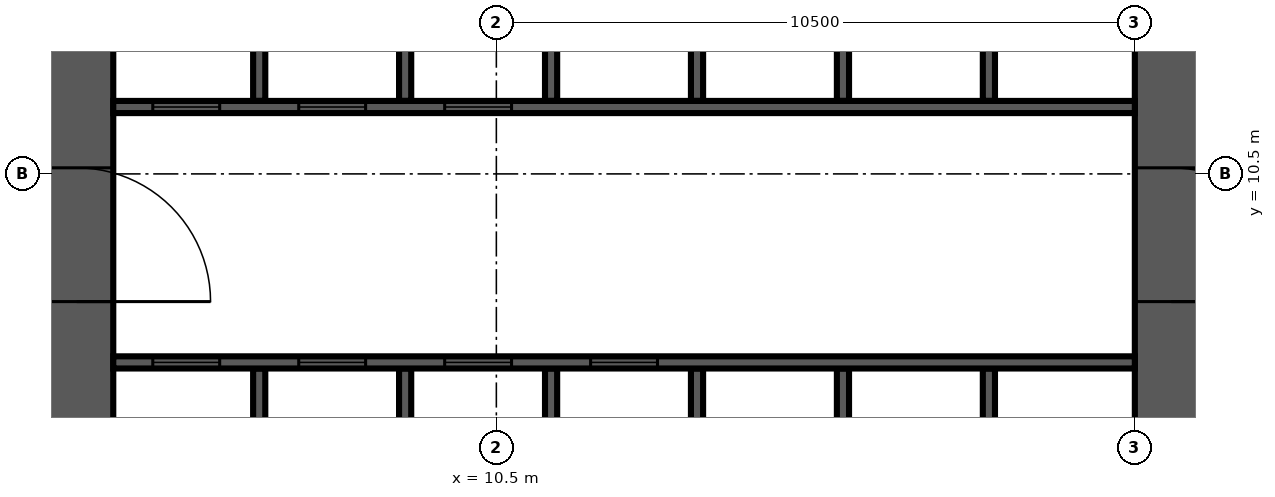
"""IFC4 building model, lengths in metres.
Left out: names, types, materials, properties, quantities, classifications, styles, units other than length and angle.
Written with IfcOpenShell. Run it as: python <this file> out.ifc"""

import sys

from ifc_helpers import new_model, si_unit, direction, frame, frame_2d, origin, place, context, subcontext, project, spatial, rectangle, extrude, source, transform, mapped, element, fill, save


model = new_model("IFC4")
c1 = context("Model", 3, precision=1e-05, world=origin(), true_north=direction((0.0, 1.0)))
c2 = subcontext(c1, "Body", "Model", "MODEL_VIEW")
j1 = project(units=[si_unit("LENGTHUNIT", "METRE"), si_unit("PLANEANGLEUNIT", "RADIAN")], contexts=[c1])
p1 = place(None, origin())
s1 = spatial("IfcSite", under=j1, at=p1, CompositionType="ELEMENT")
p2 = place(p1, origin())
s2 = spatial("IfcBuilding", under=s1, at=p2, CompositionType="ELEMENT")
p3 = place(p2, frame((0.0, 0.0, 86.7)))
s3 = spatial("IfcBuildingStorey", under=s2, at=p3, CompositionType="ELEMENT", Elevation=86.7)
m1 = source(origin(), c2, "Body", "SweptSolid", [
    extrude(rectangle(XDim=18.0, YDim=1.2, at=frame_2d((9.0, 0.0))), origin(), (0.0, 0.0, 1.0), 4.2),
])
p4 = place(p3, frame((3.6, 4.2, 0.0), z_axis=(0.0, 0.0, 1.0), x_axis=(0.0, 1.0, 0.0)))
e1 = element("IfcWall", 1, at=p4, inside=s3, PredefinedType="SHEAR", context=c2, shape_type="MappedRepresentation", body=[
    mapped(m1, transform((0.0, 0.0, 0.0), scale=1.0)),
])
m2 = source(origin(), c2, "Body", "SweptSolid", [
    extrude(rectangle(XDim=2.2, YDim=2.1, at=frame_2d((1.1, 1.05))), frame((0.0, 0.61, 0.0), z_axis=(0.0, -1.0, 0.0), x_axis=(1.0, 0.0, 0.0)), (0.0, 0.0, 1.0), 1.22),
])
p5 = place(p4, frame((4.2, 0.0, 0.0)))
e2 = element("IfcOpeningElement", 2, at=p5, cuts=e1, PredefinedType="OPENING", context=c2, shape_type="MappedRepresentation", body=[
    mapped(m2, transform((0.0, 0.0, 0.0), scale=1.0)),
])
m3 = source(origin(), c2, "Body", "SweptSolid", [
    extrude(rectangle(XDim=16.8, YDim=1.2, at=frame_2d((8.4, 0.0))), origin(), (0.0, 0.0, 1.0), 4.2),
])
p6 = place(p3, frame((21.6, 4.2, 0.0), z_axis=(0.0, 0.0, 1.0), x_axis=(0.0, 1.0, 0.0)))
e3 = element("IfcWall", 3, at=p6, inside=s3, PredefinedType="SHEAR", context=c2, shape_type="MappedRepresentation", body=[
    mapped(m3, transform((0.0, 0.0, 0.0), scale=1.0)),
])
p7 = place(p6, frame((4.2, 0.0, 0.0)))
e4 = element("IfcOpeningElement", 4, at=p7, cuts=e3, PredefinedType="OPENING", context=c2, shape_type="MappedRepresentation", body=[
    mapped(m2, transform((0.0, 0.0, 0.0), scale=1.0)),
])
m4 = source(origin(), c2, "Body", "SweptSolid", [
    extrude(rectangle(XDim=1.2, YDim=2.1, at=frame_2d((0.6, 1.05))), frame((0.0, 0.61, 0.0), z_axis=(0.0, -1.0, 0.0), x_axis=(1.0, 0.0, 0.0)), (0.0, 0.0, 1.0), 1.22),
])
p8 = place(p6, frame((14.7, 0.0, 0.0)))
e5 = element("IfcOpeningElement", 5, at=p8, cuts=e3, PredefinedType="OPENING", context=c2, shape_type="MappedRepresentation", body=[
    mapped(m4, transform((0.0, 0.0, 0.0), scale=1.0)),
])
m5 = source(origin(), c2, "Body", "SweptSolid", [
    extrude(rectangle(XDim=3.1, YDim=0.2, at=frame_2d((1.55, 0.0))), origin(), (0.0, 0.0, 1.0), 4.2),
])
for number, where, z_axis, x_axis in (
    (6, (6.6, 4.2, 0.0), (0.0, 0.0, 1.0), (0.0, 1.0, 0.0)),
    (7, (9.0, 4.2, 0.0), (0.0, 0.0, 1.0), (0.0, 1.0, 0.0)),
    (8, (11.4, 4.2, 0.0), (0.0, 0.0, 1.0), (0.0, 1.0, 0.0)),
    (9, (13.8, 4.2, 0.0), (0.0, 0.0, 1.0), (0.0, 1.0, 0.0)),
    (10, (16.2, 4.2, 0.0), (0.0, 0.0, 1.0), (0.0, 1.0, 0.0)),
    (11, (18.6, 4.2, 0.0), (0.0, 0.0, 1.0), (0.0, 1.0, 0.0)),
):
    element("IfcWall", number, at=place(p3, frame(where, z_axis=z_axis, x_axis=x_axis)), inside=s3, PredefinedType="SOLIDWALL", context=c2, shape_type="MappedRepresentation", body=[
        mapped(m5, transform((0.0, 0.0, 0.0), scale=1.0)),
    ])
m6 = source(origin(), c2, "Body", "SweptSolid", [
    extrude(rectangle(XDim=3.0, YDim=0.2, at=frame_2d((1.5, 0.0))), origin(), (0.0, 0.0, 1.0), 4.2),
])
for number, where, z_axis, x_axis in (
    (12, (6.6, 11.7, 0.0), (0.0, 0.0, 1.0), (0.0, 1.0, 0.0)),
    (13, (9.0, 11.7, 0.0), (0.0, 0.0, 1.0), (0.0, 1.0, 0.0)),
    (14, (11.4, 11.7, 0.0), (0.0, 0.0, 1.0), (0.0, 1.0, 0.0)),
    (15, (13.8, 11.7, 0.0), (0.0, 0.0, 1.0), (0.0, 1.0, 0.0)),
    (16, (16.2, 11.7, 0.0), (0.0, 0.0, 1.0), (0.0, 1.0, 0.0)),
    (17, (18.6, 11.7, 0.0), (0.0, 0.0, 1.0), (0.0, 1.0, 0.0)),
):
    element("IfcWall", number, at=place(p3, frame(where, z_axis=z_axis, x_axis=x_axis)), inside=s3, PredefinedType="SOLIDWALL", context=c2, shape_type="MappedRepresentation", body=[
        mapped(m6, transform((0.0, 0.0, 0.0), scale=1.0)),
    ])
m7 = source(origin(), c2, "Body", "SweptSolid", [
    extrude(rectangle(XDim=16.8, YDim=0.2, at=frame_2d((8.4, 0.0))), origin(), (0.0, 0.0, 1.0), 4.2),
])
p9 = place(p3, frame((4.2, 7.4, 0.0), z_axis=(0.0, 0.0, 1.0), x_axis=(1.0, 0.0, 0.0)))
e18 = element("IfcWall", 18, at=p9, inside=s3, PredefinedType="SOLIDWALL", context=c2, shape_type="MappedRepresentation", body=[
    mapped(m7, transform((0.0, 0.0, 0.0), scale=1.0)),
])
m8 = source(origin(), c2, "Body", "SweptSolid", [
    extrude(rectangle(XDim=1.1, YDim=2.1, at=frame_2d((0.55, 1.05))), frame((0.0, 0.11, 0.0), z_axis=(0.0, -1.0, 0.0), x_axis=(1.0, 0.0, 0.0)), (0.0, 0.0, 1.0), 0.22),
])
p10 = place(p9, frame((0.65, 0.0, 0.0)))
e19 = element("IfcOpeningElement", 19, at=p10, cuts=e18, PredefinedType="OPENING", context=c2, shape_type="MappedRepresentation", body=[
    mapped(m8, transform((0.0, 0.0, 0.0), scale=1.0)),
])
p11 = place(p9, frame((3.05, 0.0, 0.0)))
e20 = element("IfcOpeningElement", 20, at=p11, cuts=e18, PredefinedType="OPENING", context=c2, shape_type="MappedRepresentation", body=[
    mapped(m8, transform((0.0, 0.0, 0.0), scale=1.0)),
])
p12 = place(p9, frame((5.45, 0.0, 0.0)))
e21 = element("IfcOpeningElement", 21, at=p12, cuts=e18, PredefinedType="OPENING", context=c2, shape_type="MappedRepresentation", body=[
    mapped(m8, transform((0.0, 0.0, 0.0), scale=1.0)),
])
p13 = place(p9, frame((7.85, 0.0, 0.0)))
e22 = element("IfcOpeningElement", 22, at=p13, cuts=e18, PredefinedType="OPENING", context=c2, shape_type="MappedRepresentation", body=[
    mapped(m8, transform((0.0, 0.0, 0.0), scale=1.0)),
])
p14 = place(p3, frame((4.2, 11.6, 0.0), z_axis=(0.0, 0.0, 1.0), x_axis=(1.0, 0.0, 0.0)))
e23 = element("IfcWall", 23, at=p14, inside=s3, PredefinedType="SOLIDWALL", context=c2, shape_type="MappedRepresentation", body=[
    mapped(m7, transform((0.0, 0.0, 0.0), scale=1.0)),
])
p15 = place(p14, frame((0.65, 0.0, 0.0)))
e24 = element("IfcOpeningElement", 24, at=p15, cuts=e23, PredefinedType="OPENING", context=c2, shape_type="MappedRepresentation", body=[
    mapped(m8, transform((0.0, 0.0, 0.0), scale=1.0)),
])
p16 = place(p14, frame((3.05, 0.0, 0.0)))
e25 = element("IfcOpeningElement", 25, at=p16, cuts=e23, PredefinedType="OPENING", context=c2, shape_type="MappedRepresentation", body=[
    mapped(m8, transform((0.0, 0.0, 0.0), scale=1.0)),
])
p17 = place(p14, frame((5.45, 0.0, 0.0)))
e26 = element("IfcOpeningElement", 26, at=p17, cuts=e23, PredefinedType="OPENING", context=c2, shape_type="MappedRepresentation", body=[
    mapped(m8, transform((0.0, 0.0, 0.0), scale=1.0)),
])
m9 = source(origin(), c2, "Body", "SweptSolid", [
    extrude(rectangle(XDim=1.1, YDim=2.1, at=frame_2d((0.55, 1.05))), frame((0.0, 0.025, 0.0), z_axis=(0.0, -1.0, 0.0), x_axis=(1.0, 0.0, 0.0)), (0.0, 0.0, 1.0), 0.05),
])
p18 = place(p10, origin())
e27 = element("IfcDoor", 27, at=p18, inside=s3, OperationType="SLIDING_TO_LEFT", PredefinedType="DOOR", context=c2, shape_type="MappedRepresentation", body=[
    mapped(m9, transform((0.0, 0.0, 0.0), scale=1.0)),
])
fill(e19, e27)
p19 = place(p11, origin())
e28 = element("IfcDoor", 28, at=p19, inside=s3, OperationType="SLIDING_TO_LEFT", PredefinedType="DOOR", context=c2, shape_type="MappedRepresentation", body=[
    mapped(m9, transform((0.0, 0.0, 0.0), scale=1.0)),
])
fill(e20, e28)
p20 = place(p12, origin())
e29 = element("IfcDoor", 29, at=p20, inside=s3, OperationType="SLIDING_TO_LEFT", PredefinedType="DOOR", context=c2, shape_type="MappedRepresentation", body=[
    mapped(m9, transform((0.0, 0.0, 0.0), scale=1.0)),
])
fill(e21, e29)
p21 = place(p13, origin())
e30 = element("IfcDoor", 30, at=p21, inside=s3, OperationType="SLIDING_TO_LEFT", PredefinedType="DOOR", context=c2, shape_type="MappedRepresentation", body=[
    mapped(m9, transform((0.0, 0.0, 0.0), scale=1.0)),
])
fill(e22, e30)
p22 = place(p15, origin())
e31 = element("IfcDoor", 31, at=p22, inside=s3, OperationType="SLIDING_TO_LEFT", PredefinedType="DOOR", context=c2, shape_type="MappedRepresentation", body=[
    mapped(m9, transform((0.0, 0.0, 0.0), scale=1.0)),
])
fill(e24, e31)
p23 = place(p16, origin())
e32 = element("IfcDoor", 32, at=p23, inside=s3, OperationType="SLIDING_TO_LEFT", PredefinedType="DOOR", context=c2, shape_type="MappedRepresentation", body=[
    mapped(m9, transform((0.0, 0.0, 0.0), scale=1.0)),
])
fill(e25, e32)
p24 = place(p17, origin())
e33 = element("IfcDoor", 33, at=p24, inside=s3, OperationType="SLIDING_TO_LEFT", PredefinedType="DOOR", context=c2, shape_type="MappedRepresentation", body=[
    mapped(m9, transform((0.0, 0.0, 0.0), scale=1.0)),
])
fill(e26, e33)
m10 = source(origin(), c2, "Body", "SweptSolid", [
    extrude(rectangle(XDim=2.2, YDim=2.1, at=frame_2d((1.1, 1.05))), frame((0.0, 0.025, 0.0), z_axis=(0.0, -1.0, 0.0), x_axis=(1.0, 0.0, 0.0)), (0.0, 0.0, 1.0), 0.05),
])
p25 = place(p7, origin())
e34 = element("IfcDoor", 34, at=p25, inside=s3, OperationType="DOUBLE_DOOR_SINGLE_SWING", PredefinedType="DOOR", context=c2, shape_type="MappedRepresentation", body=[
    mapped(m10, transform((0.0, 0.0, 0.0), scale=1.0)),
])
fill(e4, e34)
p26 = place(p5, origin())
e35 = element("IfcDoor", 35, at=p26, inside=s3, OperationType="DOUBLE_DOOR_SINGLE_SWING", PredefinedType="DOOR", context=c2, shape_type="MappedRepresentation", body=[
    mapped(m10, transform((0.0, 0.0, 0.0), scale=1.0)),
])
fill(e2, e35)
save(model, sys.argv[1])
